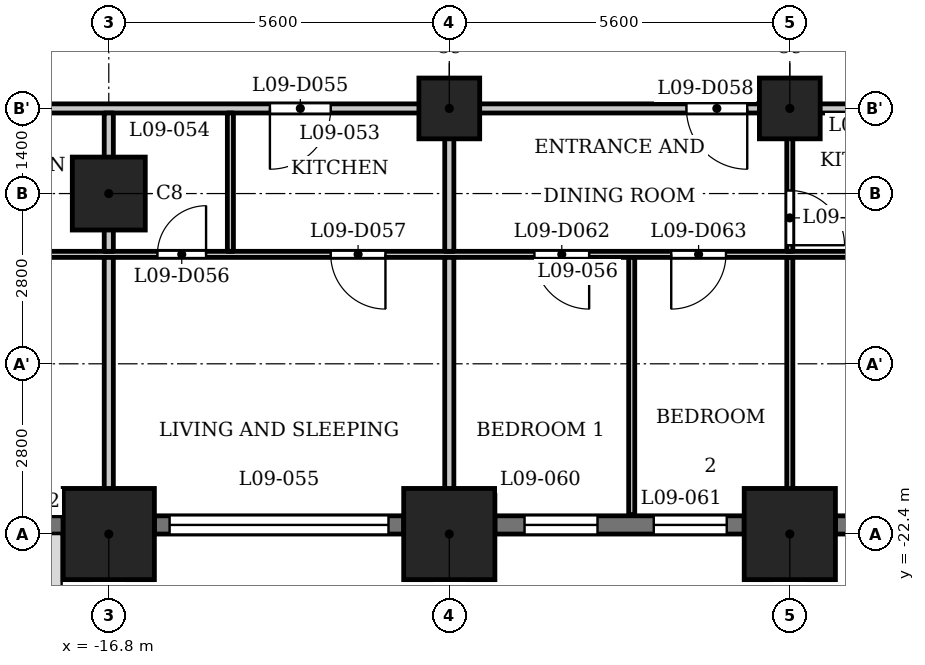
"""IFC4 building model, lengths in metres.
Left out: names, types, materials, properties, quantities, classifications, styles, units other than length and angle.
Written with IfcOpenShell. Run it as: python <this file> out.ifc"""

import sys

from ifc_helpers import new_model, si_unit, direction, frame, frame_2d, origin, origin_2d, place, context, subcontext, project, spatial, rectangle, extrude, element, fill, save


model = new_model("IFC4")
c1 = context("Model", 3, precision=1e-05, world=origin(), true_north=direction((0.0, 1.0)))
c2 = subcontext(c1, "Body", "Model", "MODEL_VIEW")
j1 = project(units=[si_unit("LENGTHUNIT", "METRE"), si_unit("PLANEANGLEUNIT", "RADIAN")], contexts=[c1])
p1 = place(None, origin())
s1 = spatial("IfcSite", under=j1, at=p1, CompositionType="ELEMENT")
p2 = place(p1, origin())
s2 = spatial("IfcBuilding", under=s1, at=p2, CompositionType="ELEMENT")
p3 = place(p2, frame((0.0, 0.0, 41.0)))
s3 = spatial("IfcBuildingStorey", under=s2, at=p3, CompositionType="ELEMENT", Elevation=41.0)
for number, where, z_axis, x_axis in (
    (1, (-16.8, -22.4, 0.0), (0.0, 0.0, 1.0), (1.0, 0.0, 0.0)),
    (2, (-11.2, -22.4, 0.0), (0.0, 0.0, 1.0), (1.0, 0.0, 0.0)),
    (3, (-5.6, -22.4, 0.0), (0.0, 0.0, 1.0), (1.0, 0.0, 0.0)),
):
    element("IfcColumn", number, at=place(p3, frame(where, z_axis=z_axis, x_axis=x_axis)), inside=s3, PredefinedType="COLUMN", context=c2, shape_type="SweptSolid", body=[
        extrude(rectangle(XDim=1.5, YDim=1.5, at=origin_2d()), origin(), (0.0, 0.0, 1.0), 3.5),
    ])
p4 = place(p3, frame((-16.8, -16.8, 0.0), z_axis=(0.0, 0.0, 1.0), x_axis=(1.0, 0.0, 0.0)))
e4 = element("IfcColumn", 4, at=p4, inside=s3, PredefinedType="COLUMN", context=c2, shape_type="SweptSolid", body=[
    extrude(rectangle(XDim=1.2, YDim=1.2, at=origin_2d()), origin(), (0.0, 0.0, 1.0), 3.5),
])
for number, where, z_axis, x_axis in (
    (5, (-11.2, -15.4, 0.0), (0.0, 0.0, 1.0), (1.0, 0.0, 0.0)),
    (6, (-5.6, -15.4, 0.0), (0.0, 0.0, 1.0), (1.0, 0.0, 0.0)),
):
    element("IfcColumn", number, at=place(p3, frame(where, z_axis=z_axis, x_axis=x_axis)), inside=s3, PredefinedType="COLUMN", context=c2, shape_type="SweptSolid", body=[
        extrude(rectangle(XDim=1.0, YDim=1.0, at=origin_2d()), origin(), (0.0, 0.0, 1.0), 3.5),
    ])
p5 = place(p3, frame((-20.0, -22.25, 0.0), z_axis=(0.0, 0.0, 1.0), x_axis=(1.0, 0.0, 0.0)))
e7 = element("IfcWall", 7, at=p5, inside=s3, PredefinedType="SOLIDWALL", context=c2, shape_type="SweptSolid", body=[
    extrude(rectangle(XDim=2.45, YDim=0.3, at=frame_2d((1.225, 0.0))), origin(), (0.0, 0.0, 1.0), 2.35),
])
p6 = place(p5, frame((0.325, 0.0, 0.9)))
e8 = element("IfcOpeningElement", 8, at=p6, cuts=e7, PredefinedType="OPENING", context=c2, shape_type="SweptSolid", body=[
    extrude(rectangle(XDim=1.8, YDim=1.25, at=frame_2d((0.9, 0.625))), frame((0.0, 0.16, 0.0), z_axis=(0.0, -1.0, 0.0), x_axis=(1.0, 0.0, 0.0)), (0.0, 0.0, 1.0), 0.32),
])
p7 = place(p3, frame((-16.05, -22.25, 0.0), z_axis=(0.0, 0.0, 1.0), x_axis=(1.0, 0.0, 0.0)))
e9 = element("IfcWall", 9, at=p7, inside=s3, PredefinedType="SOLIDWALL", context=c2, shape_type="SweptSolid", body=[
    extrude(rectangle(XDim=4.1, YDim=0.3, at=frame_2d((2.05, 0.0))), origin(), (0.0, 0.0, 1.0), 2.35),
])
p8 = place(p7, frame((0.25, 0.0, 1.2)))
e10 = element("IfcOpeningElement", 10, at=p8, cuts=e9, PredefinedType="OPENING", context=c2, shape_type="SweptSolid", body=[
    extrude(rectangle(XDim=3.6, YDim=0.95, at=frame_2d((1.8, 0.475))), frame((0.0, 0.16, 0.0), z_axis=(0.0, -1.0, 0.0), x_axis=(1.0, 0.0, 0.0)), (0.0, 0.0, 1.0), 0.32),
])
p9 = place(p3, frame((-10.45, -22.25, 0.0), z_axis=(0.0, 0.0, 1.0), x_axis=(1.0, 0.0, 0.0)))
e11 = element("IfcWall", 11, at=p9, inside=s3, PredefinedType="SOLIDWALL", context=c2, shape_type="SweptSolid", body=[
    extrude(rectangle(XDim=4.1, YDim=0.3, at=frame_2d((2.05, 0.0))), origin(), (0.0, 0.0, 1.0), 2.35),
])
p10 = place(p9, frame((0.488, 0.0, 0.6)))
e12 = element("IfcOpeningElement", 12, at=p10, cuts=e11, PredefinedType="OPENING", context=c2, shape_type="SweptSolid", body=[
    extrude(rectangle(XDim=1.2, YDim=1.55, at=frame_2d((0.6, 0.775))), frame((0.0, 0.16, 0.0), z_axis=(0.0, -1.0, 0.0), x_axis=(1.0, 0.0, 0.0)), (0.0, 0.0, 1.0), 0.32),
])
p11 = place(p9, frame((2.613, 0.0, 0.6)))
e13 = element("IfcOpeningElement", 13, at=p11, cuts=e11, PredefinedType="OPENING", context=c2, shape_type="SweptSolid", body=[
    extrude(rectangle(XDim=1.2, YDim=1.55, at=frame_2d((0.6, 0.775))), frame((0.0, 0.16, 0.0), z_axis=(0.0, -1.0, 0.0), x_axis=(1.0, 0.0, 0.0)), (0.0, 0.0, 1.0), 0.32),
])
p12 = place(p3, frame((-4.85, -22.25, 0.0), z_axis=(0.0, 0.0, 1.0), x_axis=(1.0, 0.0, 0.0)))
e14 = element("IfcWall", 14, at=p12, inside=s3, PredefinedType="SOLIDWALL", context=c2, shape_type="SweptSolid", body=[
    extrude(rectangle(XDim=4.1, YDim=0.3, at=frame_2d((2.05, 0.0))), origin(), (0.0, 0.0, 1.0), 2.35),
])
p13 = place(p12, frame((0.25, 0.0, 1.2)))
e15 = element("IfcOpeningElement", 15, at=p13, cuts=e14, PredefinedType="OPENING", context=c2, shape_type="SweptSolid", body=[
    extrude(rectangle(XDim=3.6, YDim=0.95, at=frame_2d((1.8, 0.475))), frame((0.0, 0.16, 0.0), z_axis=(0.0, -1.0, 0.0), x_axis=(1.0, 0.0, 0.0)), (0.0, 0.0, 1.0), 0.32),
])
p14 = place(p3, frame((-26.394, -17.8, 0.0), z_axis=(0.0, 0.0, 1.0), x_axis=(1.0, 0.0, 0.0)))
e16 = element("IfcWall", 16, at=p14, inside=s3, PredefinedType="PARTITIONING", context=c2, shape_type="SweptSolid", body=[
    extrude(rectangle(XDim=53.126, YDim=0.1, at=frame_2d((26.563, 0.0))), origin(), (0.0, 0.0, 1.0), 3.2),
])
p15 = place(p14, frame((0.794, 0.0, 0.0)))
e17 = element("IfcOpeningElement", 17, at=p15, cuts=e16, PredefinedType="OPENING", context=c2, shape_type="SweptSolid", body=[
    extrude(rectangle(XDim=0.8, YDim=2.1, at=frame_2d((0.4, 1.05))), frame((0.0, 0.06, 0.0), z_axis=(0.0, -1.0, 0.0), x_axis=(1.0, 0.0, 0.0)), (0.0, 0.0, 1.0), 0.12),
])
p16 = place(p14, frame((5.644, 0.0, 0.0)))
e18 = element("IfcOpeningElement", 18, at=p16, cuts=e16, PredefinedType="OPENING", context=c2, shape_type="SweptSolid", body=[
    extrude(rectangle(XDim=0.9, YDim=2.1, at=frame_2d((0.45, 1.05))), frame((0.0, 0.06, 0.0), z_axis=(0.0, -1.0, 0.0), x_axis=(1.0, 0.0, 0.0)), (0.0, 0.0, 1.0), 0.12),
])
p17 = place(p14, frame((10.394, 0.0, 0.0)))
e19 = element("IfcOpeningElement", 19, at=p17, cuts=e16, PredefinedType="OPENING", context=c2, shape_type="SweptSolid", body=[
    extrude(rectangle(XDim=0.8, YDim=2.1, at=frame_2d((0.4, 1.05))), frame((0.0, 0.06, 0.0), z_axis=(0.0, -1.0, 0.0), x_axis=(1.0, 0.0, 0.0)), (0.0, 0.0, 1.0), 0.12),
])
p18 = place(p14, frame((13.244, 0.0, 0.0)))
e20 = element("IfcOpeningElement", 20, at=p18, cuts=e16, PredefinedType="OPENING", context=c2, shape_type="SweptSolid", body=[
    extrude(rectangle(XDim=0.9, YDim=2.1, at=frame_2d((0.45, 1.05))), frame((0.0, 0.06, 0.0), z_axis=(0.0, -1.0, 0.0), x_axis=(1.0, 0.0, 0.0)), (0.0, 0.0, 1.0), 0.12),
])
p19 = place(p14, frame((23.944, 0.0, 0.0)))
e21 = element("IfcOpeningElement", 21, at=p19, cuts=e16, PredefinedType="OPENING", context=c2, shape_type="SweptSolid", body=[
    extrude(rectangle(XDim=0.8, YDim=2.1, at=frame_2d((0.4, 1.05))), frame((0.0, 0.06, 0.0), z_axis=(0.0, -1.0, 0.0), x_axis=(1.0, 0.0, 0.0)), (0.0, 0.0, 1.0), 0.12),
])
p20 = place(p14, frame((22.194, 0.0, 0.0)))
e22 = element("IfcOpeningElement", 22, at=p20, cuts=e16, PredefinedType="OPENING", context=c2, shape_type="SweptSolid", body=[
    extrude(rectangle(XDim=0.9, YDim=2.1, at=frame_2d((0.45, 1.05))), frame((0.0, 0.06, 0.0), z_axis=(0.0, -1.0, 0.0), x_axis=(1.0, 0.0, 0.0)), (0.0, 0.0, 1.0), 0.12),
])
p21 = place(p14, frame((16.594, 0.0, 0.0)))
e23 = element("IfcOpeningElement", 23, at=p21, cuts=e16, PredefinedType="OPENING", context=c2, shape_type="SweptSolid", body=[
    extrude(rectangle(XDim=0.9, YDim=2.1, at=frame_2d((0.45, 1.05))), frame((0.0, 0.06, 0.0), z_axis=(0.0, -1.0, 0.0), x_axis=(1.0, 0.0, 0.0)), (0.0, 0.0, 1.0), 0.12),
])
p22 = place(p14, frame((18.844, 0.0, 0.0)))
e24 = element("IfcOpeningElement", 24, at=p22, cuts=e16, PredefinedType="OPENING", context=c2, shape_type="SweptSolid", body=[
    extrude(rectangle(XDim=0.9, YDim=2.1, at=frame_2d((0.45, 1.05))), frame((0.0, 0.06, 0.0), z_axis=(0.0, -1.0, 0.0), x_axis=(1.0, 0.0, 0.0)), (0.0, 0.0, 1.0), 0.12),
])
p23 = place(p14, frame((30.544, 0.0, 0.0)))
e25 = element("IfcOpeningElement", 25, at=p23, cuts=e16, PredefinedType="OPENING", context=c2, shape_type="SweptSolid", body=[
    extrude(rectangle(XDim=0.8, YDim=2.1, at=frame_2d((0.4, 1.05))), frame((0.0, 0.06, 0.0), z_axis=(0.0, -1.0, 0.0), x_axis=(1.0, 0.0, 0.0)), (0.0, 0.0, 1.0), 0.12),
])
p24 = place(p14, frame((27.294, 0.0, 0.0)))
e26 = element("IfcOpeningElement", 26, at=p24, cuts=e16, PredefinedType="OPENING", context=c2, shape_type="SweptSolid", body=[
    extrude(rectangle(XDim=0.9, YDim=2.1, at=frame_2d((0.45, 1.05))), frame((0.0, 0.06, 0.0), z_axis=(0.0, -1.0, 0.0), x_axis=(1.0, 0.0, 0.0)), (0.0, 0.0, 1.0), 0.12),
])
p25 = place(p14, frame((35.894, 0.0, 0.0)))
e27 = element("IfcOpeningElement", 27, at=p25, cuts=e16, PredefinedType="OPENING", context=c2, shape_type="SweptSolid", body=[
    extrude(rectangle(XDim=0.8, YDim=2.1, at=frame_2d((0.4, 1.05))), frame((0.0, 0.06, 0.0), z_axis=(0.0, -1.0, 0.0), x_axis=(1.0, 0.0, 0.0)), (0.0, 0.0, 1.0), 0.12),
])
p26 = place(p14, frame((33.644, 0.0, 0.0)))
e28 = element("IfcOpeningElement", 28, at=p26, cuts=e16, PredefinedType="OPENING", context=c2, shape_type="SweptSolid", body=[
    extrude(rectangle(XDim=0.9, YDim=2.1, at=frame_2d((0.45, 1.05))), frame((0.0, 0.06, 0.0), z_axis=(0.0, -1.0, 0.0), x_axis=(1.0, 0.0, 0.0)), (0.0, 0.0, 1.0), 0.12),
])
p27 = place(p14, frame((41.494, 0.0, 0.0)))
e29 = element("IfcOpeningElement", 29, at=p27, cuts=e16, PredefinedType="OPENING", context=c2, shape_type="SweptSolid", body=[
    extrude(rectangle(XDim=0.8, YDim=2.1, at=frame_2d((0.4, 1.05))), frame((0.0, 0.06, 0.0), z_axis=(0.0, -1.0, 0.0), x_axis=(1.0, 0.0, 0.0)), (0.0, 0.0, 1.0), 0.12),
])
p28 = place(p14, frame((38.744, 0.0, 0.0)))
e30 = element("IfcOpeningElement", 30, at=p28, cuts=e16, PredefinedType="OPENING", context=c2, shape_type="SweptSolid", body=[
    extrude(rectangle(XDim=0.9, YDim=2.1, at=frame_2d((0.45, 1.05))), frame((0.0, 0.06, 0.0), z_axis=(0.0, -1.0, 0.0), x_axis=(1.0, 0.0, 0.0)), (0.0, 0.0, 1.0), 0.12),
])
p29 = place(p14, frame((49.362, 0.0, 0.0)))
e31 = element("IfcOpeningElement", 31, at=p29, cuts=e16, PredefinedType="OPENING", context=c2, shape_type="SweptSolid", body=[
    extrude(rectangle(XDim=0.8, YDim=2.1, at=frame_2d((0.4, 1.05))), frame((0.0, 0.06, 0.0), z_axis=(0.0, -1.0, 0.0), x_axis=(1.0, 0.0, 0.0)), (0.0, 0.0, 1.0), 0.12),
])
p30 = place(p14, frame((45.094, 0.0, 0.0)))
e32 = element("IfcOpeningElement", 32, at=p30, cuts=e16, PredefinedType="OPENING", context=c2, shape_type="SweptSolid", body=[
    extrude(rectangle(XDim=0.9, YDim=2.1, at=frame_2d((0.45, 1.05))), frame((0.0, 0.06, 0.0), z_axis=(0.0, -1.0, 0.0), x_axis=(1.0, 0.0, 0.0)), (0.0, 0.0, 1.0), 0.12),
])
p31 = place(p3, frame((-27.484, -15.4, 0.0), z_axis=(0.0, 0.0, 1.0), x_axis=(1.0, 0.0, 0.0)))
e33 = element("IfcWall", 33, at=p31, inside=s3, PredefinedType="PARTITIONING", context=c2, shape_type="SweptSolid", body=[
    extrude(rectangle(XDim=54.968, YDim=0.15, at=frame_2d((27.484, 0.0))), origin(), (0.0, 0.0, 1.0), 3.2),
])
p32 = place(p31, frame((5.734, 0.0, 0.0)))
e34 = element("IfcOpeningElement", 34, at=p32, cuts=e33, PredefinedType="OPENING", context=c2, shape_type="SweptSolid", body=[
    extrude(rectangle(XDim=1.0, YDim=2.1, at=frame_2d((0.5, 1.05))), frame((0.0, 0.085, 0.0), z_axis=(0.0, -1.0, 0.0), x_axis=(1.0, 0.0, 0.0)), (0.0, 0.0, 1.0), 0.17),
])
p33 = place(p31, frame((13.334, 0.0, 0.0)))
e35 = element("IfcOpeningElement", 35, at=p33, cuts=e33, PredefinedType="OPENING", context=c2, shape_type="SweptSolid", body=[
    extrude(rectangle(XDim=1.0, YDim=2.1, at=frame_2d((0.5, 1.05))), frame((0.0, 0.085, 0.0), z_axis=(0.0, -1.0, 0.0), x_axis=(1.0, 0.0, 0.0)), (0.0, 0.0, 1.0), 0.17),
])
p34 = place(p31, frame((20.184, 0.0, 0.0)))
e36 = element("IfcOpeningElement", 36, at=p34, cuts=e33, PredefinedType="OPENING", context=c2, shape_type="SweptSolid", body=[
    extrude(rectangle(XDim=1.0, YDim=2.1, at=frame_2d((0.5, 1.05))), frame((0.0, 0.085, 0.0), z_axis=(0.0, -1.0, 0.0), x_axis=(1.0, 0.0, 0.0)), (0.0, 0.0, 1.0), 0.17),
])
p35 = place(p31, frame((29.384, 0.0, 0.0)))
e37 = element("IfcOpeningElement", 37, at=p35, cuts=e33, PredefinedType="OPENING", context=c2, shape_type="SweptSolid", body=[
    extrude(rectangle(XDim=1.0, YDim=2.1, at=frame_2d((0.5, 1.05))), frame((0.0, 0.085, 0.0), z_axis=(0.0, -1.0, 0.0), x_axis=(1.0, 0.0, 0.0)), (0.0, 0.0, 1.0), 0.17),
])
p36 = place(p31, frame((33.734, 0.0, 0.0)))
e38 = element("IfcOpeningElement", 38, at=p36, cuts=e33, PredefinedType="OPENING", context=c2, shape_type="SweptSolid", body=[
    extrude(rectangle(XDim=1.0, YDim=2.1, at=frame_2d((0.5, 1.05))), frame((0.0, 0.085, 0.0), z_axis=(0.0, -1.0, 0.0), x_axis=(1.0, 0.0, 0.0)), (0.0, 0.0, 1.0), 0.17),
])
p37 = place(p31, frame((39.584, 0.0, 0.0)))
e39 = element("IfcOpeningElement", 39, at=p37, cuts=e33, PredefinedType="OPENING", context=c2, shape_type="SweptSolid", body=[
    extrude(rectangle(XDim=1.0, YDim=2.1, at=frame_2d((0.5, 1.05))), frame((0.0, 0.085, 0.0), z_axis=(0.0, -1.0, 0.0), x_axis=(1.0, 0.0, 0.0)), (0.0, 0.0, 1.0), 0.17),
])
p38 = place(p31, frame((45.184, 0.0, 0.0)))
e40 = element("IfcOpeningElement", 40, at=p38, cuts=e33, PredefinedType="OPENING", context=c2, shape_type="SweptSolid", body=[
    extrude(rectangle(XDim=1.0, YDim=2.1, at=frame_2d((0.5, 1.05))), frame((0.0, 0.085, 0.0), z_axis=(0.0, -1.0, 0.0), x_axis=(1.0, 0.0, 0.0)), (0.0, 0.0, 1.0), 0.17),
])
p39 = place(p3, frame((-16.8, -23.13, 0.0), z_axis=(0.0, 0.0, 1.0), x_axis=(0.0, 1.0, 0.0)))
e41 = element("IfcWall", 41, at=p39, inside=s3, PredefinedType="PARTITIONING", context=c2, shape_type="SweptSolid", body=[
    extrude(rectangle(XDim=5.28, YDim=0.15, at=frame_2d((2.64, 0.0))), origin(), (0.0, 0.0, 1.0), 3.2),
])
p40 = place(p3, frame((-16.8, -17.75, 0.0), z_axis=(0.0, 0.0, 1.0), x_axis=(0.0, 1.0, 0.0)))
e42 = element("IfcWall", 42, at=p40, inside=s3, PredefinedType="PARTITIONING", context=c2, shape_type="SweptSolid", body=[
    extrude(rectangle(XDim=2.275, YDim=0.15, at=frame_2d((1.137, 0.0))), origin(), (0.0, 0.0, 1.0), 3.2),
])
p41 = place(p3, frame((-14.8, -17.75, 0.0), z_axis=(0.0, 0.0, 1.0), x_axis=(0.0, 1.0, 0.0)))
e43 = element("IfcWall", 43, at=p41, inside=s3, PredefinedType="PARTITIONING", context=c2, shape_type="SweptSolid", body=[
    extrude(rectangle(XDim=2.275, YDim=0.1, at=frame_2d((1.137, 0.0))), origin(), (0.0, 0.0, 1.0), 3.2),
])
p42 = place(p3, frame((-11.2, -23.13, 0.0), z_axis=(0.0, 0.0, 1.0), x_axis=(0.0, 1.0, 0.0)))
e44 = element("IfcWall", 44, at=p42, inside=s3, PredefinedType="PARTITIONING", context=c2, shape_type="SweptSolid", body=[
    extrude(rectangle(XDim=5.28, YDim=0.15, at=frame_2d((2.64, 0.0))), origin(), (0.0, 0.0, 1.0), 3.2),
])
p43 = place(p3, frame((-11.2, -17.75, 0.0), z_axis=(0.0, 0.0, 1.0), x_axis=(0.0, 1.0, 0.0)))
e45 = element("IfcWall", 45, at=p43, inside=s3, PredefinedType="PARTITIONING", context=c2, shape_type="SweptSolid", body=[
    extrude(rectangle(XDim=2.275, YDim=0.15, at=frame_2d((1.137, 0.0))), origin(), (0.0, 0.0, 1.0), 3.2),
])
p44 = place(p3, frame((-8.2, -22.08, 0.0), z_axis=(0.0, 0.0, 1.0), x_axis=(0.0, 1.0, 0.0)))
e46 = element("IfcWall", 46, at=p44, inside=s3, PredefinedType="PARTITIONING", context=c2, shape_type="SweptSolid", body=[
    extrude(rectangle(XDim=4.23, YDim=0.1, at=frame_2d((2.115, 0.0))), origin(), (0.0, 0.0, 1.0), 3.2),
])
p45 = place(p3, frame((-5.6, -23.13, 0.0), z_axis=(0.0, 0.0, 1.0), x_axis=(0.0, 1.0, 0.0)))
e47 = element("IfcWall", 47, at=p45, inside=s3, PredefinedType="PARTITIONING", context=c2, shape_type="SweptSolid", body=[
    extrude(rectangle(XDim=5.28, YDim=0.1, at=frame_2d((2.64, 0.0))), origin(), (0.0, 0.0, 1.0), 3.2),
])
p46 = place(p3, frame((-5.6, -17.75, 0.0), z_axis=(0.0, 0.0, 1.0), x_axis=(0.0, 1.0, 0.0)))
e48 = element("IfcWall", 48, at=p46, inside=s3, PredefinedType="PARTITIONING", context=c2, shape_type="SweptSolid", body=[
    extrude(rectangle(XDim=2.275, YDim=0.1, at=frame_2d((1.137, 0.0))), origin(), (0.0, 0.0, 1.0), 3.2),
])
p47 = place(p46, frame((0.1, 0.0, 0.0)))
e49 = element("IfcOpeningElement", 49, at=p47, cuts=e48, PredefinedType="OPENING", context=c2, shape_type="SweptSolid", body=[
    extrude(rectangle(XDim=0.9, YDim=2.1, at=frame_2d((0.45, 1.05))), frame((0.0, 0.06, 0.0), z_axis=(0.0, -1.0, 0.0), x_axis=(1.0, 0.0, 0.0)), (0.0, 0.0, 1.0), 0.12),
])
p48 = place(p33, origin())
e50 = element("IfcDoor", 50, at=p48, inside=s3, OperationType="SINGLE_SWING_LEFT", PredefinedType="DOOR", context=c2, shape_type="SweptSolid", body=[
    extrude(rectangle(XDim=1.0, YDim=2.1, at=frame_2d((0.5, 1.05))), frame((0.0, 0.025, 0.0), z_axis=(0.0, -1.0, 0.0), x_axis=(1.0, 0.0, 0.0)), (0.0, 0.0, 1.0), 0.05),
])
fill(e35, e50)
p49 = place(p17, origin())
e51 = element("IfcDoor", 51, at=p49, inside=s3, OperationType="SINGLE_SWING_LEFT", PredefinedType="DOOR", context=c2, shape_type="SweptSolid", body=[
    extrude(rectangle(XDim=0.8, YDim=2.1, at=frame_2d((0.4, 1.05))), frame((0.0, 0.025, 0.0), z_axis=(0.0, -1.0, 0.0), x_axis=(1.0, 0.0, 0.0)), (0.0, 0.0, 1.0), 0.05),
])
fill(e19, e51)
p50 = place(p18, origin())
e52 = element("IfcDoor", 52, at=p50, inside=s3, OperationType="SINGLE_SWING_RIGHT", PredefinedType="DOOR", context=c2, shape_type="SweptSolid", body=[
    extrude(rectangle(XDim=0.9, YDim=2.1, at=frame_2d((0.45, 1.05))), frame((0.0, 0.025, 0.0), z_axis=(0.0, -1.0, 0.0), x_axis=(1.0, 0.0, 0.0)), (0.0, 0.0, 1.0), 0.05),
])
fill(e20, e52)
p51 = place(p34, origin())
e53 = element("IfcDoor", 53, at=p51, inside=s3, OperationType="SINGLE_SWING_RIGHT", PredefinedType="DOOR", context=c2, shape_type="SweptSolid", body=[
    extrude(rectangle(XDim=1.0, YDim=2.1, at=frame_2d((0.5, 1.05))), frame((0.0, 0.025, 0.0), z_axis=(0.0, -1.0, 0.0), x_axis=(1.0, 0.0, 0.0)), (0.0, 0.0, 1.0), 0.05),
])
fill(e36, e53)
p52 = place(p47, origin())
e54 = element("IfcDoor", 54, at=p52, inside=s3, OperationType="SINGLE_SWING_LEFT", PredefinedType="DOOR", context=c2, shape_type="SweptSolid", body=[
    extrude(rectangle(XDim=0.9, YDim=2.1, at=frame_2d((0.45, 1.05))), frame((0.0, 0.025, 0.0), z_axis=(0.0, -1.0, 0.0), x_axis=(1.0, 0.0, 0.0)), (0.0, 0.0, 1.0), 0.05),
])
fill(e49, e54)
p53 = place(p21, origin())
e55 = element("IfcDoor", 55, at=p53, inside=s3, OperationType="SINGLE_SWING_RIGHT", PredefinedType="DOOR", context=c2, shape_type="SweptSolid", body=[
    extrude(rectangle(XDim=0.9, YDim=2.1, at=frame_2d((0.45, 1.05))), frame((0.0, 0.025, 0.0), z_axis=(0.0, -1.0, 0.0), x_axis=(1.0, 0.0, 0.0)), (0.0, 0.0, 1.0), 0.05),
])
fill(e23, e55)
p54 = place(p22, origin())
e56 = element("IfcDoor", 56, at=p54, inside=s3, OperationType="SINGLE_SWING_LEFT", PredefinedType="DOOR", context=c2, shape_type="SweptSolid", body=[
    extrude(rectangle(XDim=0.9, YDim=2.1, at=frame_2d((0.45, 1.05))), frame((0.0, 0.025, 0.0), z_axis=(0.0, -1.0, 0.0), x_axis=(1.0, 0.0, 0.0)), (0.0, 0.0, 1.0), 0.05),
])
fill(e24, e56)
p55 = place(p8, origin())
e57 = element("IfcWindow", 57, at=p55, inside=s3, PartitioningType="SINGLE_PANEL", PredefinedType="WINDOW", context=c2, shape_type="SweptSolid", body=[
    extrude(rectangle(XDim=3.6, YDim=0.95, at=frame_2d((1.8, 0.475))), frame((0.0, 0.03, 0.0), z_axis=(0.0, -1.0, 0.0), x_axis=(1.0, 0.0, 0.0)), (0.0, 0.0, 1.0), 0.06),
])
fill(e10, e57)
p56 = place(p10, origin())
e58 = element("IfcWindow", 58, at=p56, inside=s3, PartitioningType="SINGLE_PANEL", PredefinedType="WINDOW", context=c2, shape_type="SweptSolid", body=[
    extrude(rectangle(XDim=1.2, YDim=1.55, at=frame_2d((0.6, 0.775))), frame((0.0, 0.03, 0.0), z_axis=(0.0, -1.0, 0.0), x_axis=(1.0, 0.0, 0.0)), (0.0, 0.0, 1.0), 0.06),
])
fill(e12, e58)
p57 = place(p11, origin())
e59 = element("IfcWindow", 59, at=p57, inside=s3, PartitioningType="SINGLE_PANEL", PredefinedType="WINDOW", context=c2, shape_type="SweptSolid", body=[
    extrude(rectangle(XDim=1.2, YDim=1.55, at=frame_2d((0.6, 0.775))), frame((0.0, 0.03, 0.0), z_axis=(0.0, -1.0, 0.0), x_axis=(1.0, 0.0, 0.0)), (0.0, 0.0, 1.0), 0.06),
])
fill(e13, e59)
save(model, sys.argv[1])
